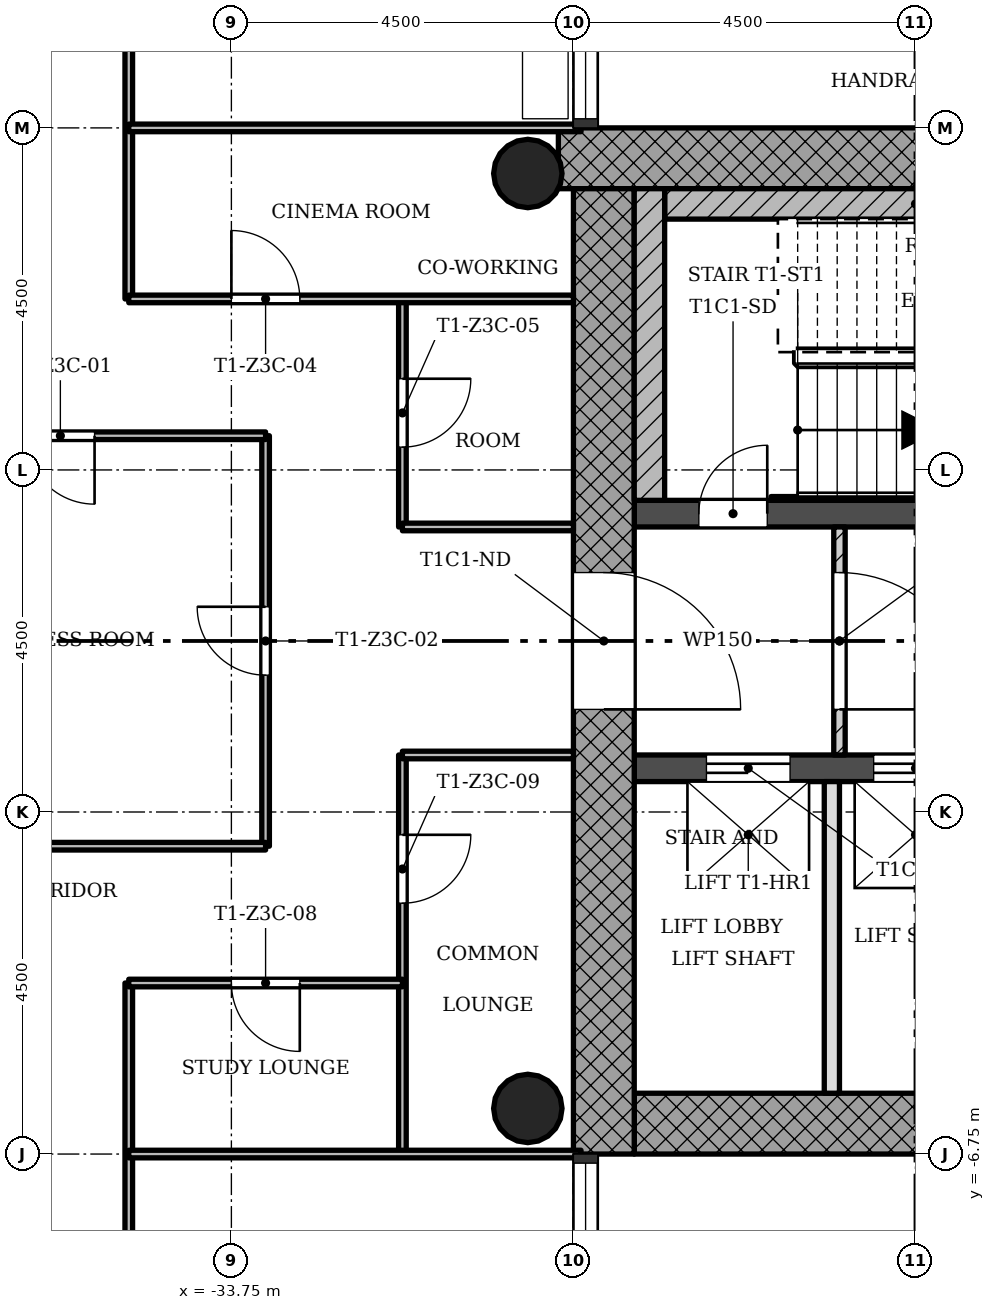
"""IFC4 building model, lengths in metres.
Left out: names, types, materials, properties, quantities, classifications, styles, units other than length and angle.
Written with IfcOpenShell. Run it as: python <this file> out.ifc"""

import sys

from ifc_helpers import new_model, si_unit, direction, frame, frame_2d, origin, origin_2d, place, context, subcontext, project, spatial, rectangle, hollow_circle, extrude, element, fill, save


model = new_model("IFC4")
c1 = context("Model", 3, precision=1e-05, world=origin(), true_north=direction((0.0, 1.0)))
c2 = subcontext(c1, "Body", "Model", "MODEL_VIEW")
j1 = project(units=[si_unit("LENGTHUNIT", "METRE"), si_unit("PLANEANGLEUNIT", "RADIAN")], contexts=[c1])
p1 = place(None, origin())
s1 = spatial("IfcSite", under=j1, at=p1, CompositionType="ELEMENT")
p2 = place(p1, origin())
s2 = spatial("IfcBuilding", under=s1, at=p2, CompositionType="ELEMENT")
p3 = place(p2, frame((0.0, 0.0, 154.1)))
s3 = spatial("IfcBuildingStorey", under=s2, at=p3, CompositionType="ELEMENT", Elevation=154.1)
p4 = place(p3, frame((-28.45, -6.35, 0.0), z_axis=(0.0, 0.0, 1.0), x_axis=(1.0, 0.0, 0.0)))
e1 = element("IfcWall", 1, at=p4, inside=s3, PredefinedType="SHEAR", context=c2, shape_type="SweptSolid", body=[
    extrude(rectangle(XDim=8.2, YDim=0.8, at=frame_2d((4.1, 0.0))), origin(), (0.0, 0.0, 1.0), 3.4),
])
p5 = place(p3, frame((-20.652, 6.35, 0.0), z_axis=(0.0, 0.0, 1.0), x_axis=(-1.0, 0.0, 0.0)))
e2 = element("IfcWall", 2, at=p5, inside=s3, PredefinedType="SHEAR", context=c2, shape_type="SweptSolid", body=[
    extrude(rectangle(XDim=8.796, YDim=0.8, at=frame_2d((4.398, 0.0))), origin(), (0.0, 0.0, 1.0), 3.4),
])
p6 = place(p3, frame((-28.85, 5.95, 0.0), z_axis=(0.0, 0.0, 1.0), x_axis=(0.0, -1.0, 0.0)))
e3 = element("IfcWall", 3, at=p6, inside=s3, PredefinedType="SHEAR", context=c2, shape_type="SweptSolid", body=[
    extrude(rectangle(XDim=12.7, YDim=0.8, at=frame_2d((6.35, 0.0))), origin(), (0.0, 0.0, 1.0), 3.4),
])
p7 = place(p6, frame((5.05, 0.0, 0.0)))
e4 = element("IfcOpeningElement", 4, at=p7, cuts=e3, PredefinedType="OPENING", context=c2, shape_type="SweptSolid", body=[
    extrude(rectangle(XDim=1.8, YDim=2.1, at=frame_2d((0.9, 1.05))), frame((0.0, 0.41, 0.0), z_axis=(0.0, -1.0, 0.0), x_axis=(1.0, 0.0, 0.0)), (0.0, 0.0, 1.0), 0.82),
])
p8 = place(p3, frame((-28.45, -1.675, 0.0), z_axis=(0.0, 0.0, 1.0), x_axis=(1.0, 0.0, 0.0)))
e5 = element("IfcWall", 5, at=p8, inside=s3, PredefinedType="SHEAR", context=c2, shape_type="SweptSolid", body=[
    extrude(rectangle(XDim=7.4, YDim=0.35, at=frame_2d((3.7, 0.0))), origin(), (0.0, 0.0, 1.0), 3.4),
])
p9 = place(p8, frame((0.95, 0.0, 0.0)))
e6 = element("IfcOpeningElement", 6, at=p9, cuts=e5, PredefinedType="OPENING", context=c2, shape_type="SweptSolid", body=[
    extrude(rectangle(XDim=1.1, YDim=2.1, at=frame_2d((0.55, 1.05))), frame((0.0, 0.185, 0.0), z_axis=(0.0, -1.0, 0.0), x_axis=(1.0, 0.0, 0.0)), (0.0, 0.0, 1.0), 0.37),
])
p10 = place(p8, frame((3.15, 0.0, 0.0)))
e7 = element("IfcOpeningElement", 7, at=p10, cuts=e5, PredefinedType="OPENING", context=c2, shape_type="SweptSolid", body=[
    extrude(rectangle(XDim=1.1, YDim=2.1, at=frame_2d((0.55, 1.05))), frame((0.0, 0.185, 0.0), z_axis=(0.0, -1.0, 0.0), x_axis=(1.0, 0.0, 0.0)), (0.0, 0.0, 1.0), 0.37),
])
p11 = place(p8, frame((5.35, 0.0, 0.0)))
e8 = element("IfcOpeningElement", 8, at=p11, cuts=e5, PredefinedType="OPENING", context=c2, shape_type="SweptSolid", body=[
    extrude(rectangle(XDim=1.1, YDim=2.1, at=frame_2d((0.55, 1.05))), frame((0.0, 0.185, 0.0), z_axis=(0.0, -1.0, 0.0), x_axis=(1.0, 0.0, 0.0)), (0.0, 0.0, 1.0), 0.37),
])
p12 = place(p3, frame((-28.45, 1.675, 0.0), z_axis=(0.0, 0.0, 1.0), x_axis=(1.0, 0.0, 0.0)))
e9 = element("IfcWall", 9, at=p12, inside=s3, PredefinedType="SHEAR", context=c2, shape_type="SweptSolid", body=[
    extrude(rectangle(XDim=7.4, YDim=0.35, at=frame_2d((3.7, 0.0))), origin(), (0.0, 0.0, 1.0), 3.4),
])
p13 = place(p12, frame((0.85, 0.0, 0.0)))
e10 = element("IfcOpeningElement", 10, at=p13, cuts=e9, PredefinedType="OPENING", context=c2, shape_type="SweptSolid", body=[
    extrude(rectangle(XDim=0.9, YDim=2.1, at=frame_2d((0.45, 1.05))), frame((0.0, 0.185, 0.0), z_axis=(0.0, -1.0, 0.0), x_axis=(1.0, 0.0, 0.0)), (0.0, 0.0, 1.0), 0.37),
])
for number, where, z_axis, x_axis in (
    (11, (-29.85, -6.15, 0.0), (0.0, 0.0, 1.0), (1.0, 0.0, 0.0)),
    (12, (-29.85, 6.15, 0.0), (0.0, 0.0, 1.0), (1.0, 0.0, 0.0)),
):
    element("IfcColumn", number, at=place(p3, frame(where, z_axis=z_axis, x_axis=x_axis)), inside=s3, PredefinedType="COLUMN", context=c2, shape_type="SweptSolid", body=[
        extrude(hollow_circle(Radius=0.45, WallThickness=0.032, at=origin_2d()), origin(), (0.0, 0.0, 1.0), 3.4),
    ])
p14 = place(p3, frame((-25.75, -1.5, 0.0), z_axis=(0.0, 0.0, 1.0), x_axis=(0.0, 1.0, 0.0)))
e13 = element("IfcWall", 13, at=p14, inside=s3, PredefinedType="PARTITIONING", context=c2, shape_type="SweptSolid", body=[
    extrude(rectangle(XDim=3.0, YDim=0.15, at=frame_2d((1.5, 0.0))), origin(), (0.0, 0.0, 1.0), 3.0),
])
p15 = place(p14, frame((0.6, 0.0, 0.0)))
e14 = element("IfcOpeningElement", 14, at=p15, cuts=e13, PredefinedType="OPENING", context=c2, shape_type="SweptSolid", body=[
    extrude(rectangle(XDim=1.8, YDim=2.1, at=frame_2d((0.9, 1.05))), frame((0.0, 0.085, 0.0), z_axis=(0.0, -1.0, 0.0), x_axis=(1.0, 0.0, 0.0)), (0.0, 0.0, 1.0), 0.17),
])
p16 = place(p3, frame((-25.85, -5.95, 0.0), z_axis=(0.0, 0.0, 1.0), x_axis=(0.0, 1.0, 0.0)))
e15 = element("IfcWall", 15, at=p16, inside=s3, PredefinedType="SOLIDWALL", context=c2, shape_type="SweptSolid", body=[
    extrude(rectangle(XDim=4.1, YDim=0.2, at=frame_2d((2.05, 0.0))), origin(), (0.0, 0.0, 1.0), 3.0),
])
for number, where, z_axis, x_axis in (
    (16, (-35.1, -8.55, 0.0), (0.0, 0.0, 1.0), (0.0, 1.0, 0.0)),
    (17, (-35.1, 4.5, 0.0), (0.0, 0.0, 1.0), (0.0, 1.0, 0.0)),
):
    element("IfcWall", number, at=place(p3, frame(where, z_axis=z_axis, x_axis=x_axis)), inside=s3, PredefinedType="PARTITIONING", context=c2, shape_type="SweptSolid", body=[
        extrude(rectangle(XDim=4.05, YDim=0.1, at=frame_2d((2.025, 0.0))), origin(), (0.0, 0.0, 1.0), 3.0),
    ])
p17 = place(p3, frame((-33.3, -2.7, 0.0), z_axis=(0.0, 0.0, 1.0), x_axis=(0.0, 1.0, 0.0)))
e18 = element("IfcWall", 18, at=p17, inside=s3, PredefinedType="PARTITIONING", context=c2, shape_type="SweptSolid", body=[
    extrude(rectangle(XDim=5.4, YDim=0.1, at=frame_2d((2.7, 0.0))), origin(), (0.0, 0.0, 1.0), 3.0),
])
p18 = place(p17, frame((2.25, 0.0, 0.0)))
e19 = element("IfcOpeningElement", 19, at=p18, cuts=e18, PredefinedType="OPENING", context=c2, shape_type="SweptSolid", body=[
    extrude(rectangle(XDim=0.9, YDim=2.1, at=frame_2d((0.45, 1.05))), frame((0.0, 0.06, 0.0), z_axis=(0.0, -1.0, 0.0), x_axis=(1.0, 0.0, 0.0)), (0.0, 0.0, 1.0), 0.12),
])
p19 = place(p3, frame((-31.5, -6.75, 0.0), z_axis=(0.0, 0.0, 1.0), x_axis=(0.0, 1.0, 0.0)))
e20 = element("IfcWall", 20, at=p19, inside=s3, PredefinedType="PARTITIONING", context=c2, shape_type="SweptSolid", body=[
    extrude(rectangle(XDim=5.25, YDim=0.1, at=frame_2d((2.625, 0.0))), origin(), (0.0, 0.0, 1.0), 3.0),
])
p20 = place(p19, frame((3.3, 0.0, 0.0)))
e21 = element("IfcOpeningElement", 21, at=p20, cuts=e20, PredefinedType="OPENING", context=c2, shape_type="SweptSolid", body=[
    extrude(rectangle(XDim=0.9, YDim=2.1, at=frame_2d((0.45, 1.05))), frame((0.0, 0.06, 0.0), z_axis=(0.0, -1.0, 0.0), x_axis=(1.0, 0.0, 0.0)), (0.0, 0.0, 1.0), 0.12),
])
p21 = place(p3, frame((-31.5, 1.5, 0.0), z_axis=(0.0, 0.0, 1.0), x_axis=(0.0, 1.0, 0.0)))
e22 = element("IfcWall", 22, at=p21, inside=s3, PredefinedType="PARTITIONING", context=c2, shape_type="SweptSolid", body=[
    extrude(rectangle(XDim=3.0, YDim=0.1, at=frame_2d((1.5, 0.0))), origin(), (0.0, 0.0, 1.0), 3.0),
])
p22 = place(p21, frame((1.05, 0.0, 0.0)))
e23 = element("IfcOpeningElement", 23, at=p22, cuts=e22, PredefinedType="OPENING", context=c2, shape_type="SweptSolid", body=[
    extrude(rectangle(XDim=0.9, YDim=2.1, at=frame_2d((0.45, 1.05))), frame((0.0, 0.06, 0.0), z_axis=(0.0, -1.0, 0.0), x_axis=(1.0, 0.0, 0.0)), (0.0, 0.0, 1.0), 0.12),
])
p23 = place(p3, frame((-35.1, -6.75, 0.0), z_axis=(0.0, 0.0, 1.0), x_axis=(1.0, 0.0, 0.0)))
e24 = element("IfcWall", 24, at=p23, inside=s3, PredefinedType="PARTITIONING", context=c2, shape_type="SweptSolid", body=[
    extrude(rectangle(XDim=5.95, YDim=0.1, at=frame_2d((2.975, 0.0))), origin(), (0.0, 0.0, 1.0), 3.0),
])
p24 = place(p3, frame((-35.1, -4.5, 0.0), z_axis=(0.0, 0.0, 1.0), x_axis=(1.0, 0.0, 0.0)))
e25 = element("IfcWall", 25, at=p24, inside=s3, PredefinedType="PARTITIONING", context=c2, shape_type="SweptSolid", body=[
    extrude(rectangle(XDim=3.6, YDim=0.1, at=frame_2d((1.8, 0.0))), origin(), (0.0, 0.0, 1.0), 3.0),
])
p25 = place(p24, frame((1.35, 0.0, 0.0)))
e26 = element("IfcOpeningElement", 26, at=p25, cuts=e25, PredefinedType="OPENING", context=c2, shape_type="SweptSolid", body=[
    extrude(rectangle(XDim=0.9, YDim=2.1, at=frame_2d((0.45, 1.05))), frame((0.0, 0.06, 0.0), z_axis=(0.0, -1.0, 0.0), x_axis=(1.0, 0.0, 0.0)), (0.0, 0.0, 1.0), 0.12),
])
p26 = place(p3, frame((-38.7, -2.7, 0.0), z_axis=(0.0, 0.0, 1.0), x_axis=(1.0, 0.0, 0.0)))
e27 = element("IfcWall", 27, at=p26, inside=s3, PredefinedType="PARTITIONING", context=c2, shape_type="SweptSolid", body=[
    extrude(rectangle(XDim=5.4, YDim=0.1, at=frame_2d((2.7, 0.0))), origin(), (0.0, 0.0, 1.0), 3.0),
])
for number, where, z_axis, x_axis in (
    (28, (-31.5, -1.5, 0.0), (0.0, 0.0, 1.0), (1.0, 0.0, 0.0)),
    (29, (-31.5, 1.5, 0.0), (0.0, 0.0, 1.0), (1.0, 0.0, 0.0)),
):
    element("IfcWall", number, at=place(p3, frame(where, z_axis=z_axis, x_axis=x_axis)), inside=s3, PredefinedType="PARTITIONING", context=c2, shape_type="SweptSolid", body=[
        extrude(rectangle(XDim=2.25, YDim=0.1, at=frame_2d((1.125, 0.0))), origin(), (0.0, 0.0, 1.0), 3.0),
    ])
p27 = place(p3, frame((-38.7, 2.7, 0.0), z_axis=(0.0, 0.0, 1.0), x_axis=(1.0, 0.0, 0.0)))
e30 = element("IfcWall", 30, at=p27, inside=s3, PredefinedType="PARTITIONING", context=c2, shape_type="SweptSolid", body=[
    extrude(rectangle(XDim=5.4, YDim=0.1, at=frame_2d((2.7, 0.0))), origin(), (0.0, 0.0, 1.0), 3.0),
])
p28 = place(p27, frame((2.25, 0.0, 0.0)))
e31 = element("IfcOpeningElement", 31, at=p28, cuts=e30, PredefinedType="OPENING", context=c2, shape_type="SweptSolid", body=[
    extrude(rectangle(XDim=0.9, YDim=2.1, at=frame_2d((0.45, 1.05))), frame((0.0, 0.06, 0.0), z_axis=(0.0, -1.0, 0.0), x_axis=(1.0, 0.0, 0.0)), (0.0, 0.0, 1.0), 0.12),
])
p29 = place(p3, frame((-35.1, 4.5, 0.0), z_axis=(0.0, 0.0, 1.0), x_axis=(1.0, 0.0, 0.0)))
e32 = element("IfcWall", 32, at=p29, inside=s3, PredefinedType="PARTITIONING", context=c2, shape_type="SweptSolid", body=[
    extrude(rectangle(XDim=5.85, YDim=0.1, at=frame_2d((2.925, 0.0))), origin(), (0.0, 0.0, 1.0), 3.0),
])
p30 = place(p29, frame((1.35, 0.0, 0.0)))
e33 = element("IfcOpeningElement", 33, at=p30, cuts=e32, PredefinedType="OPENING", context=c2, shape_type="SweptSolid", body=[
    extrude(rectangle(XDim=0.9, YDim=2.1, at=frame_2d((0.45, 1.05))), frame((0.0, 0.06, 0.0), z_axis=(0.0, -1.0, 0.0), x_axis=(1.0, 0.0, 0.0)), (0.0, 0.0, 1.0), 0.12),
])
p31 = place(p3, frame((-35.1, 6.75, 0.0), z_axis=(0.0, 0.0, 1.0), x_axis=(1.0, 0.0, 0.0)))
e34 = element("IfcWall", 34, at=p31, inside=s3, PredefinedType="PARTITIONING", context=c2, shape_type="SweptSolid", body=[
    extrude(rectangle(XDim=5.95, YDim=0.1, at=frame_2d((2.975, 0.0))), origin(), (0.0, 0.0, 1.0), 3.0),
])
p32 = place(p3, frame((-28.05, 5.75, 0.0), z_axis=(0.0, 0.0, 1.0), x_axis=(1.0, 0.0, 0.0)))
e35 = element("IfcWall", 35, at=p32, inside=s3, PredefinedType="SHEAR", context=c2, shape_type="SweptSolid", body=[
    extrude(rectangle(XDim=6.6, YDim=0.4, at=frame_2d((3.3, 0.0))), origin(), (0.0, 0.0, 1.0), 3.4),
])
p33 = place(p3, frame((-28.25, 1.85, 0.0), z_axis=(0.0, 0.0, 1.0), x_axis=(0.0, 1.0, 0.0)))
e36 = element("IfcWall", 36, at=p33, inside=s3, PredefinedType="SHEAR", context=c2, shape_type="SweptSolid", body=[
    extrude(rectangle(XDim=4.1, YDim=0.4, at=frame_2d((2.05, 0.0))), origin(), (0.0, 0.0, 1.0), 3.4),
])
p34 = place(p3, frame((-26.65, 1.875, 0.0), z_axis=(0.0, 0.0, 1.0), x_axis=(1.0, 0.0, 0.0)))
e37 = element("IfcWall", 37, at=p34, inside=s3, PredefinedType="SHEAR", context=c2, shape_type="SweptSolid", body=[
    extrude(rectangle(XDim=5.2, YDim=0.05, at=frame_2d((2.6, 0.0))), origin(), (0.0, 0.0, 1.0), 3.4),
])
p35 = place(p15, origin())
e38 = element("IfcDoor", 38, at=p35, inside=s3, OperationType="SINGLE_SWING_LEFT", PredefinedType="DOOR", context=c2, shape_type="SweptSolid", body=[
    extrude(rectangle(XDim=1.8, YDim=2.1, at=frame_2d((0.9, 1.05))), frame((0.0, 0.025, 0.0), z_axis=(0.0, -1.0, 0.0), x_axis=(1.0, 0.0, 0.0)), (0.0, 0.0, 1.0), 0.05),
])
fill(e14, e38)
p36 = place(p28, origin())
e39 = element("IfcDoor", 39, at=p36, inside=s3, OperationType="SINGLE_SWING_RIGHT", PredefinedType="DOOR", context=c2, shape_type="SweptSolid", body=[
    extrude(rectangle(XDim=0.9, YDim=2.1, at=frame_2d((0.45, 1.05))), frame((0.0, 0.025, 0.0), z_axis=(0.0, -1.0, 0.0), x_axis=(1.0, 0.0, 0.0)), (0.0, 0.0, 1.0), 0.05),
])
fill(e31, e39)
p37 = place(p18, origin())
e40 = element("IfcDoor", 40, at=p37, inside=s3, OperationType="SINGLE_SWING_LEFT", PredefinedType="DOOR", context=c2, shape_type="SweptSolid", body=[
    extrude(rectangle(XDim=0.9, YDim=2.1, at=frame_2d((0.45, 1.05))), frame((0.0, 0.025, 0.0), z_axis=(0.0, -1.0, 0.0), x_axis=(1.0, 0.0, 0.0)), (0.0, 0.0, 1.0), 0.05),
])
fill(e19, e40)
p38 = place(p30, origin())
e41 = element("IfcDoor", 41, at=p38, inside=s3, OperationType="SINGLE_SWING_RIGHT", PredefinedType="DOOR", context=c2, shape_type="SweptSolid", body=[
    extrude(rectangle(XDim=0.9, YDim=2.1, at=frame_2d((0.45, 1.05))), frame((0.0, 0.025, 0.0), z_axis=(0.0, -1.0, 0.0), x_axis=(1.0, 0.0, 0.0)), (0.0, 0.0, 1.0), 0.05),
])
fill(e33, e41)
p39 = place(p22, origin())
e42 = element("IfcDoor", 42, at=p39, inside=s3, OperationType="SINGLE_SWING_RIGHT", PredefinedType="DOOR", context=c2, shape_type="SweptSolid", body=[
    extrude(rectangle(XDim=0.9, YDim=2.1, at=frame_2d((0.45, 1.05))), frame((0.0, 0.025, 0.0), z_axis=(0.0, -1.0, 0.0), x_axis=(1.0, 0.0, 0.0)), (0.0, 0.0, 1.0), 0.05),
])
fill(e23, e42)
p40 = place(p25, origin())
e43 = element("IfcDoor", 43, at=p40, inside=s3, OperationType="SINGLE_SWING_RIGHT", PredefinedType="DOOR", context=c2, shape_type="SweptSolid", body=[
    extrude(rectangle(XDim=0.9, YDim=2.1, at=frame_2d((0.45, 1.05))), frame((0.0, 0.025, 0.0), z_axis=(0.0, -1.0, 0.0), x_axis=(1.0, 0.0, 0.0)), (0.0, 0.0, 1.0), 0.05),
])
fill(e26, e43)
p41 = place(p20, origin())
e44 = element("IfcDoor", 44, at=p41, inside=s3, OperationType="SINGLE_SWING_RIGHT", PredefinedType="DOOR", context=c2, shape_type="SweptSolid", body=[
    extrude(rectangle(XDim=0.9, YDim=2.1, at=frame_2d((0.45, 1.05))), frame((0.0, 0.025, 0.0), z_axis=(0.0, -1.0, 0.0), x_axis=(1.0, 0.0, 0.0)), (0.0, 0.0, 1.0), 0.05),
])
fill(e21, e44)
p42 = place(p13, origin())
e45 = element("IfcDoor", 45, at=p42, inside=s3, OperationType="SINGLE_SWING_LEFT", PredefinedType="DOOR", context=c2, shape_type="SweptSolid", body=[
    extrude(rectangle(XDim=0.9, YDim=2.1, at=frame_2d((0.45, 1.05))), frame((0.0, 0.025, 0.0), z_axis=(0.0, -1.0, 0.0), x_axis=(1.0, 0.0, 0.0)), (0.0, 0.0, 1.0), 0.05),
])
fill(e10, e45)
p43 = place(p9, origin())
e46 = element("IfcDoor", 46, at=p43, inside=s3, OperationType="SLIDING_TO_LEFT", PredefinedType="DOOR", context=c2, shape_type="SweptSolid", body=[
    extrude(rectangle(XDim=1.1, YDim=2.1, at=frame_2d((0.55, 1.05))), frame((0.0, 0.025, 0.0), z_axis=(0.0, -1.0, 0.0), x_axis=(1.0, 0.0, 0.0)), (0.0, 0.0, 1.0), 0.05),
])
fill(e6, e46)
p44 = place(p10, origin())
e47 = element("IfcDoor", 47, at=p44, inside=s3, OperationType="SLIDING_TO_LEFT", PredefinedType="DOOR", context=c2, shape_type="SweptSolid", body=[
    extrude(rectangle(XDim=1.1, YDim=2.1, at=frame_2d((0.55, 1.05))), frame((0.0, 0.025, 0.0), z_axis=(0.0, -1.0, 0.0), x_axis=(1.0, 0.0, 0.0)), (0.0, 0.0, 1.0), 0.05),
])
fill(e7, e47)
p45 = place(p7, origin())
e48 = element("IfcDoor", 48, at=p45, inside=s3, OperationType="SINGLE_SWING_LEFT", PredefinedType="DOOR", context=c2, shape_type="SweptSolid", body=[
    extrude(rectangle(XDim=1.8, YDim=2.1, at=frame_2d((0.9, 1.05))), frame((0.0, 0.025, 0.0), z_axis=(0.0, -1.0, 0.0), x_axis=(1.0, 0.0, 0.0)), (0.0, 0.0, 1.0), 0.05),
])
fill(e4, e48)
save(model, sys.argv[1])
